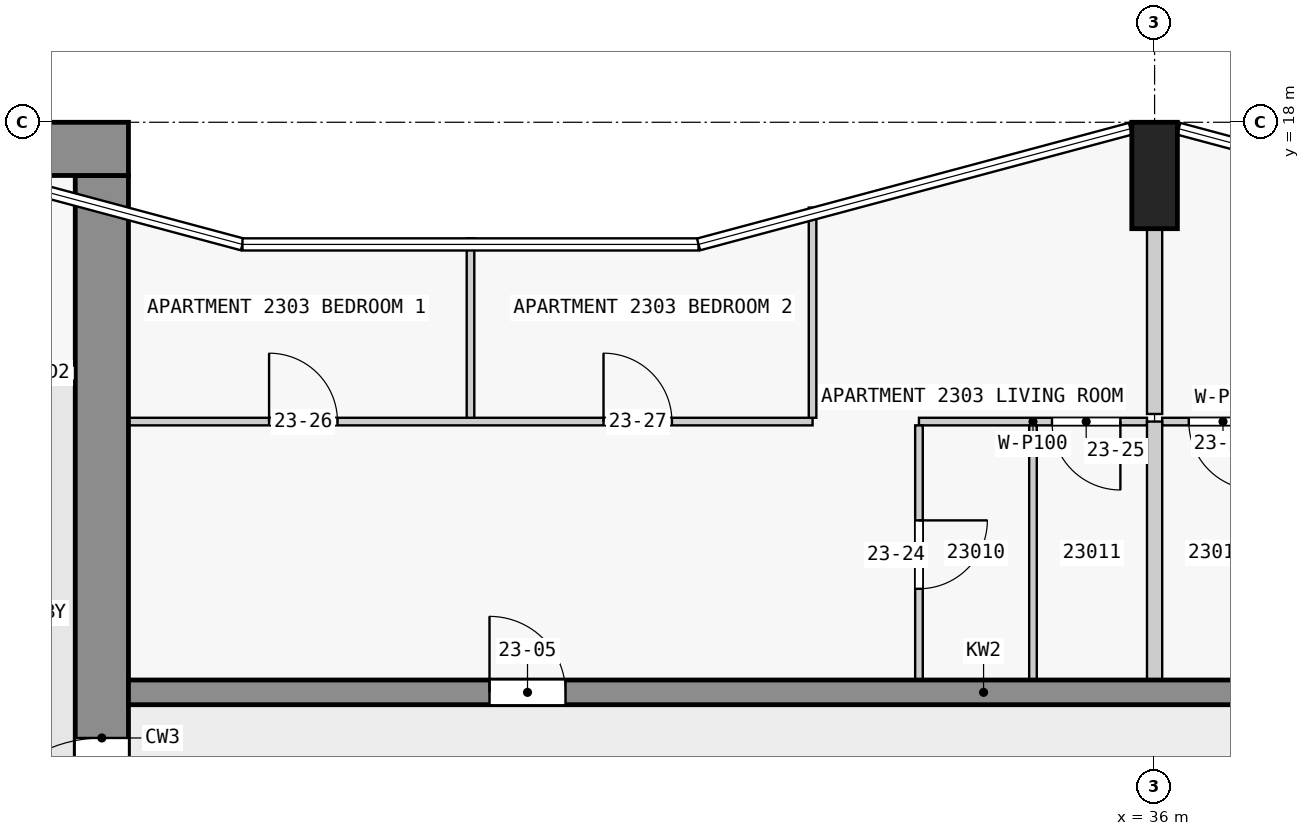
"""IFC4 building model, lengths in metres.
Left out: names, types, materials, properties, quantities, classifications, styles, units other than length and angle.
Written with IfcOpenShell. Run it as: python <this file> out.ifc"""

import sys

from ifc_helpers import new_model, si_unit, direction, frame, frame_2d, origin, origin_2d, place, context, subcontext, project, spatial, rectangle, extrude, element, fill, save


model = new_model("IFC4")
c1 = context("Model", 3, precision=1e-05, world=origin(), true_north=direction((0.0, 1.0)))
c2 = subcontext(c1, "Body", "Model", "MODEL_VIEW")
j1 = project(units=[si_unit("LENGTHUNIT", "METRE"), si_unit("PLANEANGLEUNIT", "RADIAN")], contexts=[c1])
p1 = place(None, origin())
s1 = spatial("IfcSite", under=j1, at=p1, CompositionType="ELEMENT")
p2 = place(p1, origin())
s2 = spatial("IfcBuilding", under=s1, at=p2, CompositionType="ELEMENT")
p3 = place(p2, frame((0.0, 0.0, 92.3)))
s3 = spatial("IfcBuildingStorey", under=s2, at=p3, CompositionType="ELEMENT", Elevation=92.3)
p4 = place(p3, frame((36.0, 17.3, 0.0), z_axis=(0.0, 0.0, 1.0), x_axis=(1.0, 0.0, 0.0)))
e1 = element("IfcColumn", 1, at=p4, inside=s3, PredefinedType="COLUMN", context=c2, shape_type="SweptSolid", body=[
    extrude(rectangle(XDim=0.6, YDim=1.4, at=origin_2d()), origin(), (0.0, 0.0, 1.0), 3.5),
])
p5 = place(p3, frame((1.6, 17.65, 0.0), z_axis=(0.0, 0.0, 1.0), x_axis=(1.0, 0.0, 0.0)))
e2 = element("IfcWall", 2, at=p5, inside=s3, PredefinedType="SHEAR", context=c2, shape_type="SweptSolid", body=[
    extrude(rectangle(XDim=20.9, YDim=0.7, at=frame_2d((10.45, 0.0))), origin(), (0.0, 0.0, 1.0), 3.25),
])
p6 = place(p5, frame((6.5, 0.0, 0.0)))
e3 = element("IfcOpeningElement", 3, at=p6, cuts=e2, PredefinedType="OPENING", context=c2, shape_type="SweptSolid", body=[
    extrude(rectangle(XDim=1.8, YDim=2.1, at=frame_2d((0.9, 1.05))), frame((0.0, 0.36, 0.0), z_axis=(0.0, -1.0, 0.0), x_axis=(1.0, 0.0, 0.0)), (0.0, 0.0, 1.0), 0.72),
])
p7 = place(p3, frame((22.15, 2.5, 0.0), z_axis=(0.0, 0.0, 1.0), x_axis=(0.0, 1.0, 0.0)))
e4 = element("IfcWall", 4, at=p7, inside=s3, PredefinedType="SHEAR", context=c2, shape_type="SweptSolid", body=[
    extrude(rectangle(XDim=14.8, YDim=0.7, at=frame_2d((7.4, 0.0))), origin(), (0.0, 0.0, 1.0), 3.25),
])
p8 = place(p7, frame((5.6, 0.0, 0.0)))
e5 = element("IfcOpeningElement", 5, at=p8, cuts=e4, PredefinedType="OPENING", context=c2, shape_type="SweptSolid", body=[
    extrude(rectangle(XDim=1.8, YDim=2.1, at=frame_2d((0.9, 1.05))), frame((0.0, 0.36, 0.0), z_axis=(0.0, -1.0, 0.0), x_axis=(1.0, 0.0, 0.0)), (0.0, 0.0, 1.0), 0.72),
])
p9 = place(p3, frame((22.5, 10.5, 0.0), z_axis=(0.0, 0.0, 1.0), x_axis=(1.0, 0.0, 0.0)))
e6 = element("IfcWall", 6, at=p9, inside=s3, PredefinedType="SHEAR", context=c2, shape_type="SweptSolid", body=[
    extrude(rectangle(XDim=22.5, YDim=0.325, at=frame_2d((11.25, 0.0))), origin(), (0.0, 0.0, 1.0), 3.25),
])
p10 = place(p9, frame((4.75, 0.0, 0.0)))
e7 = element("IfcOpeningElement", 7, at=p10, cuts=e6, PredefinedType="OPENING", context=c2, shape_type="SweptSolid", body=[
    extrude(rectangle(XDim=1.0, YDim=2.1, at=frame_2d((0.5, 1.05))), frame((0.0, 0.172, 0.0), z_axis=(0.0, -1.0, 0.0), x_axis=(1.0, 0.0, 0.0)), (0.0, 0.0, 1.0), 0.345),
])
p11 = place(p9, frame((16.85, 0.0, 0.0)))
e8 = element("IfcOpeningElement", 8, at=p11, cuts=e6, PredefinedType="OPENING", context=c2, shape_type="SweptSolid", body=[
    extrude(rectangle(XDim=1.0, YDim=2.1, at=frame_2d((0.5, 1.05))), frame((0.0, 0.172, 0.0), z_axis=(0.0, -1.0, 0.0), x_axis=(1.0, 0.0, 0.0)), (0.0, 0.0, 1.0), 0.345),
])
p12 = place(p3, frame((18.6, 14.7, 0.0), z_axis=(0.0, 0.0, 1.0), x_axis=(1.0, 0.0, 0.0)))
e9 = element("IfcWall", 9, at=p12, inside=s3, PredefinedType="PARTITIONING", context=c2, shape_type="SweptSolid", body=[
    extrude(rectangle(XDim=3.2, YDim=0.2, at=frame_2d((1.6, 0.0))), origin(), (0.0, 0.0, 1.0), 3.25),
])
p13 = place(p12, frame((0.3, 0.0, 0.0)))
e10 = element("IfcOpeningElement", 10, at=p13, cuts=e9, PredefinedType="OPENING", context=c2, shape_type="SweptSolid", body=[
    extrude(rectangle(XDim=0.9, YDim=2.1, at=frame_2d((0.45, 1.05))), frame((0.0, 0.11, 0.0), z_axis=(0.0, -1.0, 0.0), x_axis=(1.0, 0.0, 0.0)), (0.0, 0.0, 1.0), 0.22),
])
p14 = place(p12, frame((1.9, 0.0, 0.0)))
e11 = element("IfcOpeningElement", 11, at=p14, cuts=e9, PredefinedType="OPENING", context=c2, shape_type="SweptSolid", body=[
    extrude(rectangle(XDim=0.9, YDim=2.1, at=frame_2d((0.45, 1.05))), frame((0.0, 0.11, 0.0), z_axis=(0.0, -1.0, 0.0), x_axis=(1.0, 0.0, 0.0)), (0.0, 0.0, 1.0), 0.22),
])
p15 = place(p3, frame((35.9, 14.062, 0.0), z_axis=(0.0, 0.0, 1.0), x_axis=(-1.0, 0.0, 0.0)))
e12 = element("IfcWall", 12, at=p15, inside=s3, PredefinedType="PARTITIONING", context=c2, shape_type="SweptSolid", body=[
    extrude(rectangle(XDim=3.0, YDim=0.1, at=frame_2d((1.5, 0.0))), origin(), (0.0, 0.0, 1.0), 3.25),
])
p16 = place(p15, frame((0.35, 0.0, 0.0)))
e13 = element("IfcOpeningElement", 13, at=p16, cuts=e12, PredefinedType="OPENING", context=c2, shape_type="SweptSolid", body=[
    extrude(rectangle(XDim=0.9, YDim=2.1, at=frame_2d((0.45, 1.05))), frame((0.0, 0.06, 0.0), z_axis=(0.0, -1.0, 0.0), x_axis=(1.0, 0.0, 0.0)), (0.0, 0.0, 1.0), 0.12),
])
p17 = place(p3, frame((39.1, 14.062, 0.0), z_axis=(0.0, 0.0, 1.0), x_axis=(-1.0, 0.0, 0.0)))
e14 = element("IfcWall", 14, at=p17, inside=s3, PredefinedType="PARTITIONING", context=c2, shape_type="SweptSolid", body=[
    extrude(rectangle(XDim=3.0, YDim=0.1, at=frame_2d((1.5, 0.0))), origin(), (0.0, 0.0, 1.0), 3.25),
])
p18 = place(p17, frame((1.75, 0.0, 0.0)))
e15 = element("IfcOpeningElement", 15, at=p18, cuts=e14, PredefinedType="OPENING", context=c2, shape_type="SweptSolid", body=[
    extrude(rectangle(XDim=0.9, YDim=2.1, at=frame_2d((0.45, 1.05))), frame((0.0, 0.06, 0.0), z_axis=(0.0, -1.0, 0.0), x_axis=(1.0, 0.0, 0.0)), (0.0, 0.0, 1.0), 0.12),
])
p19 = place(p3, frame((22.5, 14.062, 0.0), z_axis=(0.0, 0.0, 1.0), x_axis=(1.0, 0.0, 0.0)))
e16 = element("IfcWall", 16, at=p19, inside=s3, PredefinedType="PARTITIONING", context=c2, shape_type="SweptSolid", body=[
    extrude(rectangle(XDim=9.0, YDim=0.1, at=frame_2d((4.5, 0.0))), origin(), (0.0, 0.0, 1.0), 3.25),
])
p20 = place(p19, frame((1.85, 0.0, 0.0)))
e17 = element("IfcOpeningElement", 17, at=p20, cuts=e16, PredefinedType="OPENING", context=c2, shape_type="SweptSolid", body=[
    extrude(rectangle(XDim=0.9, YDim=2.1, at=frame_2d((0.45, 1.05))), frame((0.0, 0.06, 0.0), z_axis=(0.0, -1.0, 0.0), x_axis=(1.0, 0.0, 0.0)), (0.0, 0.0, 1.0), 0.12),
])
p21 = place(p19, frame((6.25, 0.0, 0.0)))
e18 = element("IfcOpeningElement", 18, at=p21, cuts=e16, PredefinedType="OPENING", context=c2, shape_type="SweptSolid", body=[
    extrude(rectangle(XDim=0.9, YDim=2.1, at=frame_2d((0.45, 1.05))), frame((0.0, 0.06, 0.0), z_axis=(0.0, -1.0, 0.0), x_axis=(1.0, 0.0, 0.0)), (0.0, 0.0, 1.0), 0.12),
])
p22 = place(p3, frame((27.0, 14.113, 0.0), z_axis=(0.0, 0.0, 1.0), x_axis=(0.0, 1.0, 0.0)))
e19 = element("IfcWall", 19, at=p22, inside=s3, PredefinedType="PARTITIONING", context=c2, shape_type="SweptSolid", body=[
    extrude(rectangle(XDim=2.361, YDim=0.1, at=frame_2d((1.18, 0.0))), origin(), (0.0, 0.0, 1.0), 3.25),
])
p23 = place(p3, frame((31.5, 14.113, 0.0), z_axis=(0.0, 0.0, 1.0), x_axis=(0.0, 1.0, 0.0)))
e20 = element("IfcWall", 20, at=p23, inside=s3, PredefinedType="PARTITIONING", context=c2, shape_type="SweptSolid", body=[
    extrude(rectangle(XDim=2.765, YDim=0.1, at=frame_2d((1.383, 0.0))), origin(), (0.0, 0.0, 1.0), 3.25),
])
p24 = place(p3, frame((32.9, 14.012, 0.0), z_axis=(0.0, 0.0, 1.0), x_axis=(0.0, -1.0, 0.0)))
e21 = element("IfcWall", 21, at=p24, inside=s3, PredefinedType="PARTITIONING", context=c2, shape_type="SweptSolid", body=[
    extrude(rectangle(XDim=3.35, YDim=0.1, at=frame_2d((1.675, 0.0))), origin(), (0.0, 0.0, 1.0), 3.25),
])
p25 = place(p24, frame((1.25, 0.0, 0.0)))
e22 = element("IfcOpeningElement", 22, at=p25, cuts=e21, PredefinedType="OPENING", context=c2, shape_type="SweptSolid", body=[
    extrude(rectangle(XDim=0.9, YDim=2.1, at=frame_2d((0.45, 1.05))), frame((0.0, 0.06, 0.0), z_axis=(0.0, -1.0, 0.0), x_axis=(1.0, 0.0, 0.0)), (0.0, 0.0, 1.0), 0.12),
])
p26 = place(p3, frame((34.4, 10.663, 0.0), z_axis=(0.0, 0.0, 1.0), x_axis=(0.0, 1.0, 0.0)))
e23 = element("IfcWall", 23, at=p26, inside=s3, PredefinedType="PARTITIONING", context=c2, shape_type="SweptSolid", body=[
    extrude(rectangle(XDim=3.35, YDim=0.1, at=frame_2d((1.675, 0.0))), origin(), (0.0, 0.0, 1.0), 3.25),
])
p27 = place(p3, frame((36.0, 16.6, 0.0), z_axis=(0.0, 0.0, 1.0), x_axis=(0.0, -1.0, 0.0)))
e24 = element("IfcWall", 24, at=p27, inside=s3, PredefinedType="PARTITIONING", context=c2, shape_type="SweptSolid", body=[
    extrude(rectangle(XDim=2.438, YDim=0.2, at=frame_2d((1.219, 0.0))), origin(), (0.0, 0.0, 1.0), 3.25),
])
p28 = place(p3, frame((36.0, 10.663, 0.0), z_axis=(0.0, 0.0, 1.0), x_axis=(0.0, 1.0, 0.0)))
e25 = element("IfcWall", 25, at=p28, inside=s3, PredefinedType="PARTITIONING", context=c2, shape_type="SweptSolid", body=[
    extrude(rectangle(XDim=3.4, YDim=0.2, at=frame_2d((1.7, 0.0))), origin(), (0.0, 0.0, 1.0), 3.25),
])
p29 = place(p8, origin())
e26 = element("IfcDoor", 26, at=p29, inside=s3, OperationType="DOUBLE_DOOR_SINGLE_SWING", PredefinedType="DOOR", context=c2, shape_type="SweptSolid", body=[
    extrude(rectangle(XDim=1.8, YDim=2.1, at=frame_2d((0.9, 1.05))), frame((0.0, 0.025, 0.0), z_axis=(0.0, -1.0, 0.0), x_axis=(1.0, 0.0, 0.0)), (0.0, 0.0, 1.0), 0.05),
])
fill(e5, e26)
p30 = place(p10, origin())
e27 = element("IfcDoor", 27, at=p30, inside=s3, OperationType="SINGLE_SWING_LEFT", PredefinedType="DOOR", context=c2, shape_type="SweptSolid", body=[
    extrude(rectangle(XDim=1.0, YDim=2.1, at=frame_2d((0.5, 1.05))), frame((0.0, 0.025, 0.0), z_axis=(0.0, -1.0, 0.0), x_axis=(1.0, 0.0, 0.0)), (0.0, 0.0, 1.0), 0.05),
])
fill(e7, e27)
p31 = place(p25, origin())
e28 = element("IfcDoor", 28, at=p31, inside=s3, OperationType="SINGLE_SWING_RIGHT", PredefinedType="DOOR", context=c2, shape_type="SweptSolid", body=[
    extrude(rectangle(XDim=0.9, YDim=2.1, at=frame_2d((0.45, 1.05))), frame((0.0, 0.025, 0.0), z_axis=(0.0, -1.0, 0.0), x_axis=(1.0, 0.0, 0.0)), (0.0, 0.0, 1.0), 0.05),
])
fill(e22, e28)
p32 = place(p16, origin())
e29 = element("IfcDoor", 29, at=p32, inside=s3, OperationType="SINGLE_SWING_LEFT", PredefinedType="DOOR", context=c2, shape_type="SweptSolid", body=[
    extrude(rectangle(XDim=0.9, YDim=2.1, at=frame_2d((0.45, 1.05))), frame((0.0, 0.025, 0.0), z_axis=(0.0, -1.0, 0.0), x_axis=(1.0, 0.0, 0.0)), (0.0, 0.0, 1.0), 0.05),
])
fill(e13, e29)
p33 = place(p20, origin())
e30 = element("IfcDoor", 30, at=p33, inside=s3, OperationType="SINGLE_SWING_LEFT", PredefinedType="DOOR", context=c2, shape_type="SweptSolid", body=[
    extrude(rectangle(XDim=0.9, YDim=2.1, at=frame_2d((0.45, 1.05))), frame((0.0, 0.025, 0.0), z_axis=(0.0, -1.0, 0.0), x_axis=(1.0, 0.0, 0.0)), (0.0, 0.0, 1.0), 0.05),
])
fill(e17, e30)
p34 = place(p21, origin())
e31 = element("IfcDoor", 31, at=p34, inside=s3, OperationType="SINGLE_SWING_RIGHT", PredefinedType="DOOR", context=c2, shape_type="SweptSolid", body=[
    extrude(rectangle(XDim=0.9, YDim=2.1, at=frame_2d((0.45, 1.05))), frame((0.0, 0.025, 0.0), z_axis=(0.0, -1.0, 0.0), x_axis=(1.0, 0.0, 0.0)), (0.0, 0.0, 1.0), 0.05),
])
fill(e18, e31)
p35 = place(p18, origin())
e32 = element("IfcDoor", 32, at=p35, inside=s3, OperationType="SINGLE_SWING_RIGHT", PredefinedType="DOOR", context=c2, shape_type="SweptSolid", body=[
    extrude(rectangle(XDim=0.9, YDim=2.1, at=frame_2d((0.45, 1.05))), frame((0.0, 0.025, 0.0), z_axis=(0.0, -1.0, 0.0), x_axis=(1.0, 0.0, 0.0)), (0.0, 0.0, 1.0), 0.05),
])
fill(e15, e32)
save(model, sys.argv[1])
